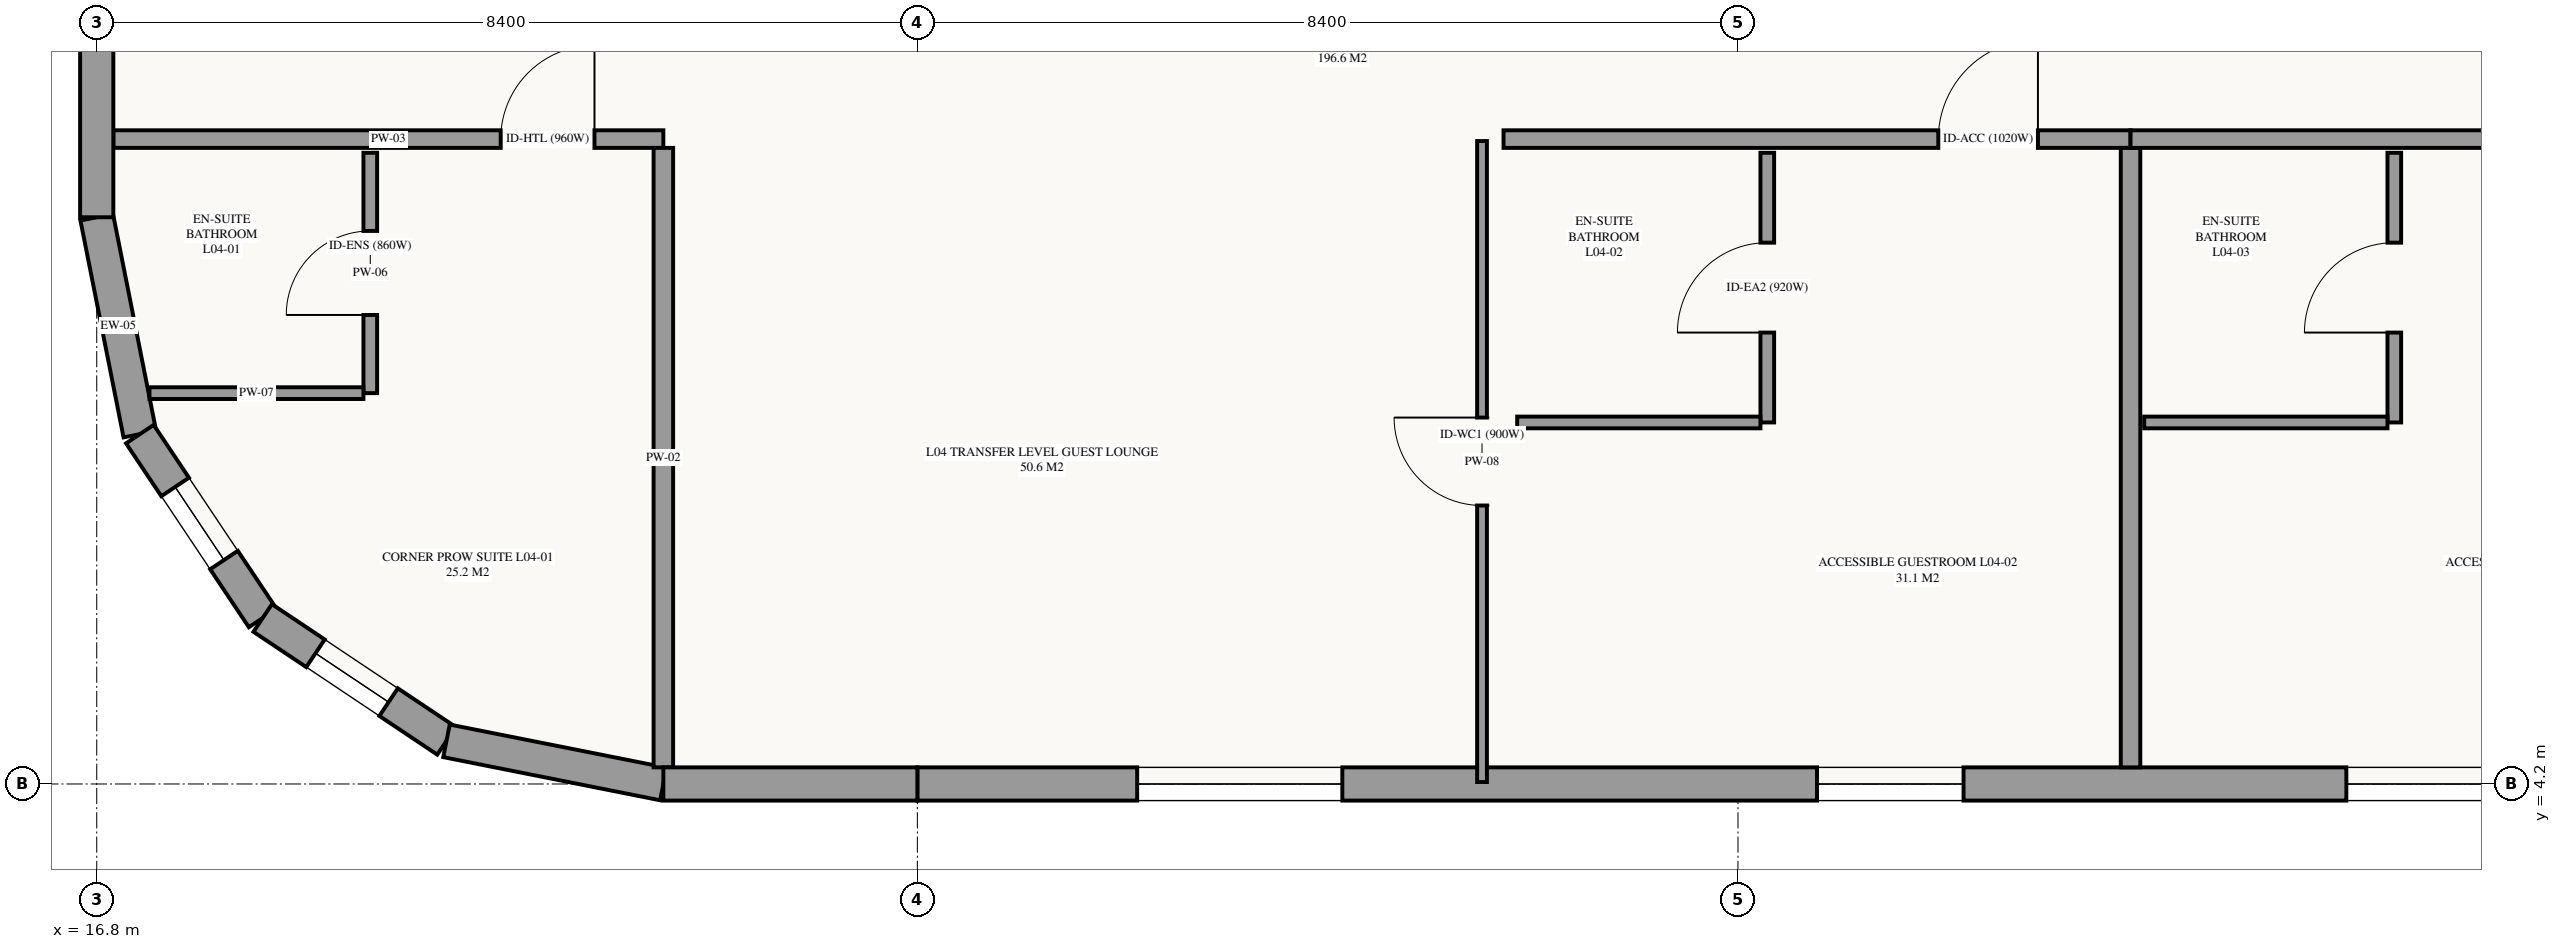
"""IFC4 building model, lengths in metres.
Left out: names, types, materials, properties, quantities, classifications, styles, units other than length and angle.
Written with IfcOpenShell. Run it as: python <this file> out.ifc"""

import sys

from ifc_helpers import new_model, si_unit, direction, frame, frame_2d, origin, origin_2d, place, context, subcontext, project, spatial, rectangle, extrude, element, fill, save


model = new_model("IFC4")
c1 = context("Model", 3, precision=1e-05, world=origin(), true_north=direction((0.0, 1.0)))
c2 = subcontext(c1, "Body", "Model", "MODEL_VIEW")
j1 = project(units=[si_unit("LENGTHUNIT", "METRE"), si_unit("PLANEANGLEUNIT", "RADIAN")], contexts=[c1])
p1 = place(None, origin())
s1 = spatial("IfcSite", under=j1, at=p1, CompositionType="ELEMENT")
p2 = place(p1, origin())
s2 = spatial("IfcBuilding", under=s1, at=p2, CompositionType="ELEMENT")
p3 = place(p2, frame((0.0, 0.0, 18.3)))
s3 = spatial("IfcBuildingStorey", under=s2, at=p3, CompositionType="ELEMENT", Elevation=18.3)
for number, where, z_axis, x_axis in (
    (1, (16.8, 4.2, 0.0), (0.0, 0.0, 1.0), (1.0, 0.0, 0.0)),
    (2, (25.2, 4.2, 0.0), (0.0, 0.0, 1.0), (1.0, 0.0, 0.0)),
    (3, (33.6, 4.2, 0.0), (0.0, 0.0, 1.0), (1.0, 0.0, 0.0)),
):
    element("IfcColumn", number, at=place(p3, frame(where, z_axis=z_axis, x_axis=x_axis)), inside=s3, PredefinedType="COLUMN", context=c2, shape_type="SweptSolid", body=[
        extrude(rectangle(XDim=0.6, YDim=0.8, at=origin_2d()), origin(), (0.0, 0.0, 1.0), 3.6),
    ])
p4 = place(p3, frame((16.8, 10.0, 0.0), z_axis=(0.0, 0.0, 1.0), x_axis=(0.195057908159, -0.980791727363, 0.0)))
e4 = element("IfcWall", 4, at=p4, inside=s3, PredefinedType="STANDARD", context=c2, shape_type="SweptSolid", body=[
    extrude(rectangle(XDim=2.263, YDim=0.34, at=frame_2d((1.131, 0.0))), origin(), (0.0, 0.0, 1.0), 2.48),
])
p5 = place(p3, frame((17.241, 7.781, 0.0), z_axis=(0.0, 0.0, 1.0), x_axis=(0.555546297918, -0.831485604728, 0.0)))
e5 = element("IfcWall", 5, at=p5, inside=s3, PredefinedType="STANDARD", context=c2, shape_type="SweptSolid", body=[
    extrude(rectangle(XDim=2.263, YDim=0.34, at=frame_2d((1.132, 0.0))), origin(), (0.0, 0.0, 1.0), 3.6),
])
p6 = place(p5, frame((0.65, 0.0, 0.75)))
e6 = element("IfcOpeningElement", 6, at=p6, cuts=e5, PredefinedType="OPENING", context=c2, shape_type="SweptSolid", body=[
    extrude(rectangle(XDim=0.9, YDim=1.55, at=frame_2d((0.45, 0.775))), frame((0.0, 0.18, 0.0), z_axis=(0.0, -1.0, 0.0), x_axis=(1.0, 0.0, 0.0)), (0.0, 0.0, 1.0), 0.36),
])
p7 = place(p3, frame((18.499, 5.899, 0.0), z_axis=(0.0, 0.0, 1.0), x_axis=(0.831502143458, -0.555521543618, 0.0)))
e7 = element("IfcWall", 7, at=p7, inside=s3, PredefinedType="STANDARD", context=c2, shape_type="SweptSolid", body=[
    extrude(rectangle(XDim=2.263, YDim=0.34, at=frame_2d((1.131, 0.0))), origin(), (0.0, 0.0, 1.0), 3.6),
])
p8 = place(p7, frame((0.65, 0.0, 0.75)))
e8 = element("IfcOpeningElement", 8, at=p8, cuts=e7, PredefinedType="OPENING", context=c2, shape_type="SweptSolid", body=[
    extrude(rectangle(XDim=0.9, YDim=1.55, at=frame_2d((0.45, 0.775))), frame((0.0, 0.18, 0.0), z_axis=(0.0, -1.0, 0.0), x_axis=(1.0, 0.0, 0.0)), (0.0, 0.0, 1.0), 0.36),
])
p9 = place(p3, frame((20.38, 4.642, 0.0), z_axis=(0.0, 0.0, 1.0), x_axis=(0.98077519094, -0.195141038321, 0.0)))
e9 = element("IfcWall", 9, at=p9, inside=s3, PredefinedType="STANDARD", context=c2, shape_type="SweptSolid", body=[
    extrude(rectangle(XDim=2.263, YDim=0.34, at=frame_2d((1.132, 0.0))), origin(), (0.0, 0.0, 1.0), 3.126),
])
p10 = place(p3, frame((25.2, 4.2, 0.0), z_axis=(0.0, 0.0, 1.0), x_axis=(1.0, 0.0, 0.0)))
e10 = element("IfcWall", 10, at=p10, inside=s3, PredefinedType="STANDARD", context=c2, shape_type="SweptSolid", body=[
    extrude(rectangle(XDim=16.8, YDim=0.34, at=frame_2d((8.4, 0.0))), origin(), (0.0, 0.0, 1.0), 2.63),
])
p11 = place(p10, frame((9.209, 0.0, 0.85)))
e11 = element("IfcOpeningElement", 11, at=p11, cuts=e10, PredefinedType="OPENING", context=c2, shape_type="SweptSolid", body=[
    extrude(rectangle(XDim=1.5, YDim=1.5, at=frame_2d((0.75, 0.75))), frame((0.0, 0.18, 0.0), z_axis=(0.0, -1.0, 0.0), x_axis=(1.0, 0.0, 0.0)), (0.0, 0.0, 1.0), 0.36),
])
p12 = place(p10, frame((14.627, 0.0, 0.85)))
e12 = element("IfcOpeningElement", 12, at=p12, cuts=e10, PredefinedType="OPENING", context=c2, shape_type="SweptSolid", body=[
    extrude(rectangle(XDim=1.5, YDim=1.5, at=frame_2d((0.75, 0.75))), frame((0.0, 0.18, 0.0), z_axis=(0.0, -1.0, 0.0), x_axis=(1.0, 0.0, 0.0)), (0.0, 0.0, 1.0), 0.36),
])
p13 = place(p10, frame((2.25, 0.0, 0.75)))
e13 = element("IfcOpeningElement", 13, at=p13, cuts=e10, PredefinedType="OPENING", context=c2, shape_type="SweptSolid", body=[
    extrude(rectangle(XDim=2.1, YDim=1.5, at=frame_2d((1.05, 0.75))), frame((0.0, 0.18, 0.0), z_axis=(0.0, -1.0, 0.0), x_axis=(1.0, 0.0, 0.0)), (0.0, 0.0, 1.0), 0.36),
])
p14 = place(p3, frame((16.97, 10.8, 0.0), z_axis=(0.0, 0.0, 1.0), x_axis=(1.0, 0.0, 0.0)))
e14 = element("IfcWall", 14, at=p14, inside=s3, PredefinedType="PARTITIONING", context=c2, shape_type="SweptSolid", body=[
    extrude(rectangle(XDim=5.63, YDim=0.18, at=frame_2d((2.815, 0.0))), origin(), (0.0, 0.0, 1.0), 3.375),
])
p15 = place(p14, frame((3.965, 0.0, 0.0)))
e15 = element("IfcOpeningElement", 15, at=p15, cuts=e14, PredefinedType="OPENING", context=c2, shape_type="SweptSolid", body=[
    extrude(rectangle(XDim=0.96, YDim=2.15, at=frame_2d((0.48, 1.075))), frame((0.0, 0.1, 0.0), z_axis=(0.0, -1.0, 0.0), x_axis=(1.0, 0.0, 0.0)), (0.0, 0.0, 1.0), 0.2),
])
p16 = place(p3, frame((22.6, 4.37, 0.0), z_axis=(0.0, 0.0, 1.0), x_axis=(0.0, 1.0, 0.0)))
e16 = element("IfcWall", 16, at=p16, inside=s3, PredefinedType="PARTITIONING", context=c2, shape_type="SweptSolid", body=[
    extrude(rectangle(XDim=6.34, YDim=0.2, at=frame_2d((3.17, 0.0))), origin(), (0.0, 0.0, 1.0), 3.375),
])
p17 = place(p3, frame((19.6, 8.2, 0.0), z_axis=(0.0, 0.0, 1.0), x_axis=(0.0, 1.0, 0.0)))
e17 = element("IfcWall", 17, at=p17, inside=s3, PredefinedType="PARTITIONING", context=c2, shape_type="SweptSolid", body=[
    extrude(rectangle(XDim=2.46, YDim=0.14, at=frame_2d((1.23, 0.0))), origin(), (0.0, 0.0, 1.0), 3.375),
])
p18 = place(p17, frame((0.8, 0.0, 0.0)))
e18 = element("IfcOpeningElement", 18, at=p18, cuts=e17, PredefinedType="OPENING", context=c2, shape_type="SweptSolid", body=[
    extrude(rectangle(XDim=0.86, YDim=2.1, at=frame_2d((0.43, 1.05))), frame((0.0, 0.08, 0.0), z_axis=(0.0, -1.0, 0.0), x_axis=(1.0, 0.0, 0.0)), (0.0, 0.0, 1.0), 0.16),
])
p19 = place(p3, frame((17.34, 8.2, 0.0), z_axis=(0.0, 0.0, 1.0), x_axis=(1.0, 0.0, 0.0)))
e19 = element("IfcWall", 19, at=p19, inside=s3, PredefinedType="PARTITIONING", context=c2, shape_type="SweptSolid", body=[
    extrude(rectangle(XDim=2.19, YDim=0.12, at=frame_2d((1.095, 0.0))), origin(), (0.0, 0.0, 1.0), 3.375),
])
p20 = place(p3, frame((31.2, 10.8, 0.0), z_axis=(0.0, 0.0, 1.0), x_axis=(1.0, 0.0, 0.0)))
e20 = element("IfcWall", 20, at=p20, inside=s3, PredefinedType="PARTITIONING", context=c2, shape_type="SweptSolid", body=[
    extrude(rectangle(XDim=6.418, YDim=0.18, at=frame_2d((3.209, 0.0))), origin(), (0.0, 0.0, 1.0), 3.375),
])
p21 = place(p20, frame((4.45, 0.0, 0.0)))
e21 = element("IfcOpeningElement", 21, at=p21, cuts=e20, PredefinedType="OPENING", context=c2, shape_type="SweptSolid", body=[
    extrude(rectangle(XDim=1.02, YDim=2.15, at=frame_2d((0.51, 1.075))), frame((0.0, 0.1, 0.0), z_axis=(0.0, -1.0, 0.0), x_axis=(1.0, 0.0, 0.0)), (0.0, 0.0, 1.0), 0.2),
])
p22 = place(p3, frame((37.618, 4.37, 0.0), z_axis=(0.0, 0.0, 1.0), x_axis=(0.0, 1.0, 0.0)))
e22 = element("IfcWall", 22, at=p22, inside=s3, PredefinedType="PARTITIONING", context=c2, shape_type="SweptSolid", body=[
    extrude(rectangle(XDim=6.34, YDim=0.2, at=frame_2d((3.17, 0.0))), origin(), (0.0, 0.0, 1.0), 3.375),
])
p23 = place(p3, frame((33.9, 7.9, 0.0), z_axis=(0.0, 0.0, 1.0), x_axis=(0.0, 1.0, 0.0)))
e23 = element("IfcWall", 23, at=p23, inside=s3, PredefinedType="PARTITIONING", context=c2, shape_type="SweptSolid", body=[
    extrude(rectangle(XDim=2.76, YDim=0.14, at=frame_2d((1.38, 0.0))), origin(), (0.0, 0.0, 1.0), 3.375),
])
p24 = place(p23, frame((0.92, 0.0, 0.0)))
e24 = element("IfcOpeningElement", 24, at=p24, cuts=e23, PredefinedType="OPENING", context=c2, shape_type="SweptSolid", body=[
    extrude(rectangle(XDim=0.92, YDim=2.1, at=frame_2d((0.46, 1.05))), frame((0.0, 0.08, 0.0), z_axis=(0.0, -1.0, 0.0), x_axis=(1.0, 0.0, 0.0)), (0.0, 0.0, 1.0), 0.16),
])
p25 = place(p3, frame((31.34, 7.9, 0.0), z_axis=(0.0, 0.0, 1.0), x_axis=(1.0, 0.0, 0.0)))
e25 = element("IfcWall", 25, at=p25, inside=s3, PredefinedType="PARTITIONING", context=c2, shape_type="SweptSolid", body=[
    extrude(rectangle(XDim=2.49, YDim=0.12, at=frame_2d((1.245, 0.0))), origin(), (0.0, 0.0, 1.0), 3.375),
])
p26 = place(p3, frame((37.618, 10.8, 0.0), z_axis=(0.0, 0.0, 1.0), x_axis=(1.0, 0.0, 0.0)))
e26 = element("IfcWall", 26, at=p26, inside=s3, PredefinedType="PARTITIONING", context=c2, shape_type="SweptSolid", body=[
    extrude(rectangle(XDim=6.418, YDim=0.18, at=frame_2d((3.209, 0.0))), origin(), (0.0, 0.0, 1.0), 3.375),
])
p27 = place(p26, frame((4.45, 0.0, 0.0)))
e27 = element("IfcOpeningElement", 27, at=p27, cuts=e26, PredefinedType="OPENING", context=c2, shape_type="SweptSolid", body=[
    extrude(rectangle(XDim=1.02, YDim=2.15, at=frame_2d((0.51, 1.075))), frame((0.0, 0.1, 0.0), z_axis=(0.0, -1.0, 0.0), x_axis=(1.0, 0.0, 0.0)), (0.0, 0.0, 1.0), 0.2),
])
p28 = place(p3, frame((40.318, 7.9, 0.0), z_axis=(0.0, 0.0, 1.0), x_axis=(0.0, 1.0, 0.0)))
e28 = element("IfcWall", 28, at=p28, inside=s3, PredefinedType="PARTITIONING", context=c2, shape_type="SweptSolid", body=[
    extrude(rectangle(XDim=2.76, YDim=0.14, at=frame_2d((1.38, 0.0))), origin(), (0.0, 0.0, 1.0), 3.375),
])
p29 = place(p28, frame((0.92, 0.0, 0.0)))
e29 = element("IfcOpeningElement", 29, at=p29, cuts=e28, PredefinedType="OPENING", context=c2, shape_type="SweptSolid", body=[
    extrude(rectangle(XDim=0.92, YDim=2.1, at=frame_2d((0.46, 1.05))), frame((0.0, 0.08, 0.0), z_axis=(0.0, -1.0, 0.0), x_axis=(1.0, 0.0, 0.0)), (0.0, 0.0, 1.0), 0.16),
])
p30 = place(p3, frame((37.758, 7.9, 0.0), z_axis=(0.0, 0.0, 1.0), x_axis=(1.0, 0.0, 0.0)))
e30 = element("IfcWall", 30, at=p30, inside=s3, PredefinedType="PARTITIONING", context=c2, shape_type="SweptSolid", body=[
    extrude(rectangle(XDim=2.49, YDim=0.12, at=frame_2d((1.245, 0.0))), origin(), (0.0, 0.0, 1.0), 3.375),
])
p31 = place(p3, frame((30.98, 4.22, 0.0), z_axis=(0.0, 0.0, 1.0), x_axis=(0.0, 1.0, 0.0)))
e31 = element("IfcWall", 31, at=p31, inside=s3, PredefinedType="PARTITIONING", context=c2, shape_type="SweptSolid", body=[
    extrude(rectangle(XDim=6.56, YDim=0.1, at=frame_2d((3.28, 0.0))), origin(), (0.0, 0.0, 1.0), 3.375),
])
p32 = place(p31, frame((2.83, 0.0, 0.0)))
e32 = element("IfcOpeningElement", 32, at=p32, cuts=e31, PredefinedType="OPENING", context=c2, shape_type="SweptSolid", body=[
    extrude(rectangle(XDim=0.9, YDim=2.12, at=frame_2d((0.45, 1.06))), frame((0.0, 0.06, 0.0), z_axis=(0.0, -1.0, 0.0), x_axis=(1.0, 0.0, 0.0)), (0.0, 0.0, 1.0), 0.12),
])
p33 = place(p3, frame((22.6, 4.2, 0.0), z_axis=(0.0, 0.0, 1.0), x_axis=(1.0, 0.0, 0.0)))
e33 = element("IfcWall", 33, at=p33, inside=s3, PredefinedType="STANDARD", context=c2, shape_type="SweptSolid", body=[
    extrude(rectangle(XDim=2.6, YDim=0.34, at=frame_2d((1.3, 0.0))), origin(), (0.0, 0.0, 1.0), 3.126),
])
p34 = place(p3, frame((16.8, 12.6, 0.0), z_axis=(0.0, 0.0, 1.0), x_axis=(0.0, -1.0, 0.0)))
e34 = element("IfcWall", 34, at=p34, inside=s3, PredefinedType="STANDARD", context=c2, shape_type="SweptSolid", body=[
    extrude(rectangle(XDim=2.6, YDim=0.34, at=frame_2d((1.3, 0.0))), origin(), (0.0, 0.0, 1.0), 2.48),
])
p35 = place(p6, origin())
e35 = element("IfcWindow", 35, at=p35, inside=s3, PartitioningType="SINGLE_PANEL", PredefinedType="WINDOW", context=c2, shape_type="SweptSolid", body=[
    extrude(rectangle(XDim=0.9, YDim=1.55, at=frame_2d((0.45, 0.775))), frame((0.0, 0.03, 0.0), z_axis=(0.0, -1.0, 0.0), x_axis=(1.0, 0.0, 0.0)), (0.0, 0.0, 1.0), 0.06),
])
fill(e6, e35)
p36 = place(p8, origin())
e36 = element("IfcWindow", 36, at=p36, inside=s3, PartitioningType="SINGLE_PANEL", PredefinedType="WINDOW", context=c2, shape_type="SweptSolid", body=[
    extrude(rectangle(XDim=0.9, YDim=1.55, at=frame_2d((0.45, 0.775))), frame((0.0, 0.03, 0.0), z_axis=(0.0, -1.0, 0.0), x_axis=(1.0, 0.0, 0.0)), (0.0, 0.0, 1.0), 0.06),
])
fill(e8, e36)
p37 = place(p11, origin())
e37 = element("IfcWindow", 37, at=p37, inside=s3, PartitioningType="SINGLE_PANEL", PredefinedType="WINDOW", context=c2, shape_type="SweptSolid", body=[
    extrude(rectangle(XDim=1.5, YDim=1.5, at=frame_2d((0.75, 0.75))), frame((0.0, 0.03, 0.0), z_axis=(0.0, -1.0, 0.0), x_axis=(1.0, 0.0, 0.0)), (0.0, 0.0, 1.0), 0.06),
])
fill(e11, e37)
p38 = place(p12, origin())
e38 = element("IfcWindow", 38, at=p38, inside=s3, PartitioningType="SINGLE_PANEL", PredefinedType="WINDOW", context=c2, shape_type="SweptSolid", body=[
    extrude(rectangle(XDim=1.5, YDim=1.5, at=frame_2d((0.75, 0.75))), frame((0.0, 0.03, 0.0), z_axis=(0.0, -1.0, 0.0), x_axis=(1.0, 0.0, 0.0)), (0.0, 0.0, 1.0), 0.06),
])
fill(e12, e38)
p39 = place(p13, origin())
e39 = element("IfcWindow", 39, at=p39, inside=s3, PartitioningType="SINGLE_PANEL", PredefinedType="WINDOW", context=c2, shape_type="SweptSolid", body=[
    extrude(rectangle(XDim=2.1, YDim=1.5, at=frame_2d((1.05, 0.75))), frame((0.0, 0.03, 0.0), z_axis=(0.0, -1.0, 0.0), x_axis=(1.0, 0.0, 0.0)), (0.0, 0.0, 1.0), 0.06),
])
fill(e13, e39)
p40 = place(p15, origin())
e40 = element("IfcDoor", 40, at=p40, inside=s3, OperationType="SINGLE_SWING_RIGHT", PredefinedType="DOOR", context=c2, shape_type="SweptSolid", body=[
    extrude(rectangle(XDim=0.96, YDim=2.15, at=frame_2d((0.48, 1.075))), frame((0.0, 0.025, 0.0), z_axis=(0.0, -1.0, 0.0), x_axis=(1.0, 0.0, 0.0)), (0.0, 0.0, 1.0), 0.05),
])
fill(e15, e40)
p41 = place(p18, origin())
e41 = element("IfcDoor", 41, at=p41, inside=s3, OperationType="SINGLE_SWING_LEFT", PredefinedType="DOOR", context=c2, shape_type="SweptSolid", body=[
    extrude(rectangle(XDim=0.86, YDim=2.1, at=frame_2d((0.43, 1.05))), frame((0.0, 0.025, 0.0), z_axis=(0.0, -1.0, 0.0), x_axis=(1.0, 0.0, 0.0)), (0.0, 0.0, 1.0), 0.05),
])
fill(e18, e41)
p42 = place(p21, origin())
e42 = element("IfcDoor", 42, at=p42, inside=s3, OperationType="SINGLE_SWING_RIGHT", PredefinedType="DOOR", context=c2, shape_type="SweptSolid", body=[
    extrude(rectangle(XDim=1.02, YDim=2.15, at=frame_2d((0.51, 1.075))), frame((0.0, 0.025, 0.0), z_axis=(0.0, -1.0, 0.0), x_axis=(1.0, 0.0, 0.0)), (0.0, 0.0, 1.0), 0.05),
])
fill(e21, e42)
p43 = place(p24, origin())
e43 = element("IfcDoor", 43, at=p43, inside=s3, OperationType="SINGLE_SWING_LEFT", PredefinedType="DOOR", context=c2, shape_type="SweptSolid", body=[
    extrude(rectangle(XDim=0.92, YDim=2.1, at=frame_2d((0.46, 1.05))), frame((0.0, 0.025, 0.0), z_axis=(0.0, -1.0, 0.0), x_axis=(1.0, 0.0, 0.0)), (0.0, 0.0, 1.0), 0.05),
])
fill(e24, e43)
p44 = place(p29, origin())
e44 = element("IfcDoor", 44, at=p44, inside=s3, OperationType="SINGLE_SWING_LEFT", PredefinedType="DOOR", context=c2, shape_type="SweptSolid", body=[
    extrude(rectangle(XDim=0.92, YDim=2.1, at=frame_2d((0.46, 1.05))), frame((0.0, 0.025, 0.0), z_axis=(0.0, -1.0, 0.0), x_axis=(1.0, 0.0, 0.0)), (0.0, 0.0, 1.0), 0.05),
])
fill(e29, e44)
p45 = place(p32, origin())
e45 = element("IfcDoor", 45, at=p45, inside=s3, OperationType="SINGLE_SWING_RIGHT", PredefinedType="DOOR", context=c2, shape_type="SweptSolid", body=[
    extrude(rectangle(XDim=0.9, YDim=2.12, at=frame_2d((0.45, 1.06))), frame((0.0, 0.025, 0.0), z_axis=(0.0, -1.0, 0.0), x_axis=(1.0, 0.0, 0.0)), (0.0, 0.0, 1.0), 0.05),
])
fill(e32, e45)
save(model, sys.argv[1])
